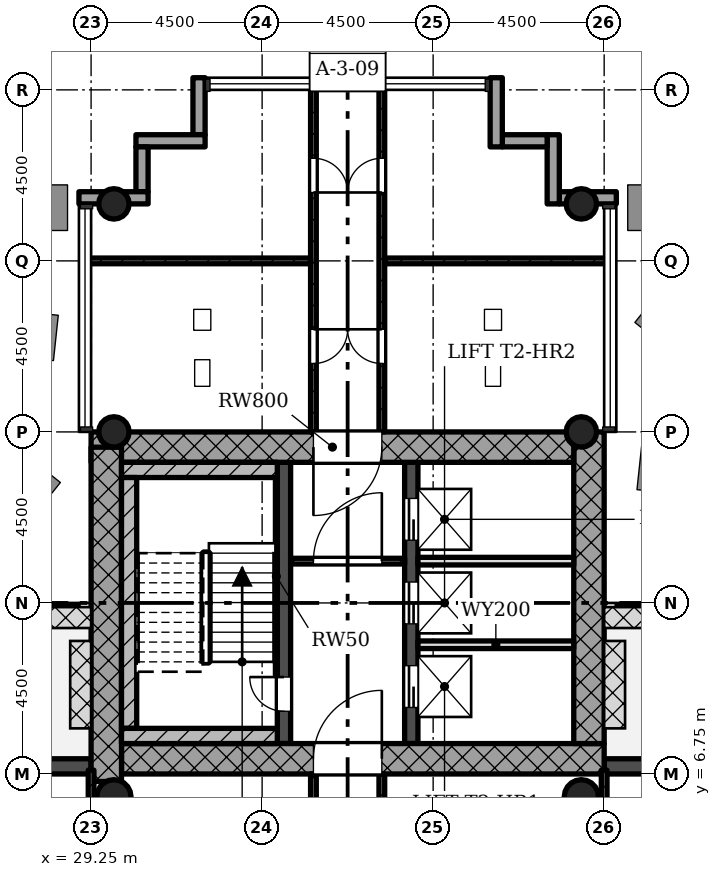
"""IFC4 building model, lengths in metres.
Left out: names, types, materials, properties, quantities, classifications, styles, units other than length and angle.
Written with IfcOpenShell. Run it as: python <this file> out.ifc"""

import sys

from ifc_helpers import new_model, si_unit, direction, frame, frame_2d, origin, origin_2d, place, context, subcontext, project, spatial, rectangle, hollow_circle, extrude, element, fill, save


model = new_model("IFC4")
c1 = context("Model", 3, precision=1e-05, world=origin(), true_north=direction((0.0, 1.0)))
c2 = subcontext(c1, "Body", "Model", "MODEL_VIEW")
j1 = project(units=[si_unit("LENGTHUNIT", "METRE"), si_unit("PLANEANGLEUNIT", "RADIAN")], contexts=[c1])
p1 = place(None, origin())
s1 = spatial("IfcSite", under=j1, at=p1, CompositionType="ELEMENT")
p2 = place(p1, origin())
s2 = spatial("IfcBuilding", under=s1, at=p2, CompositionType="ELEMENT")
p3 = place(p2, frame((0.0, 0.0, 181.3)))
s3 = spatial("IfcBuildingStorey", under=s2, at=p3, CompositionType="ELEMENT", Elevation=181.3)
p4 = place(p3, frame((30.05, 7.15, 0.0), z_axis=(0.0, 0.0, 1.0), x_axis=(1.0, 0.0, 0.0)))
e1 = element("IfcWall", 1, at=p4, inside=s3, PredefinedType="SHEAR", context=c2, shape_type="SweptSolid", body=[
    extrude(rectangle(XDim=12.7, YDim=0.8, at=frame_2d((6.35, 0.0))), origin(), (0.0, 0.0, 1.0), 4.5),
])
p5 = place(p4, frame((5.05, 0.0, 0.0)))
e2 = element("IfcOpeningElement", 2, at=p5, cuts=e1, PredefinedType="OPENING", context=c2, shape_type="SweptSolid", body=[
    extrude(rectangle(XDim=1.8, YDim=2.1, at=frame_2d((0.9, 1.05))), frame((0.0, 0.41, 0.0), z_axis=(0.0, -1.0, 0.0), x_axis=(1.0, 0.0, 0.0)), (0.0, 0.0, 1.0), 0.82),
])
p6 = place(p3, frame((42.35, 7.55, 0.0), z_axis=(0.0, 0.0, 1.0), x_axis=(0.0, 1.0, 0.0)))
e3 = element("IfcWall", 3, at=p6, inside=s3, PredefinedType="SHEAR", context=c2, shape_type="SweptSolid", body=[
    extrude(rectangle(XDim=8.2, YDim=0.8, at=frame_2d((4.1, 0.0))), origin(), (0.0, 0.0, 1.0), 4.5),
])
p7 = place(p3, frame((41.95, 15.35, 0.0), z_axis=(0.0, 0.0, 1.0), x_axis=(-1.0, 0.0, 0.0)))
e4 = element("IfcWall", 4, at=p7, inside=s3, PredefinedType="SHEAR", context=c2, shape_type="SweptSolid", body=[
    extrude(rectangle(XDim=12.7, YDim=0.8, at=frame_2d((6.35, 0.0))), origin(), (0.0, 0.0, 1.0), 4.5),
])
p8 = place(p7, frame((5.05, 0.0, 0.0)))
e5 = element("IfcOpeningElement", 5, at=p8, cuts=e4, PredefinedType="OPENING", context=c2, shape_type="SweptSolid", body=[
    extrude(rectangle(XDim=1.8, YDim=2.1, at=frame_2d((0.9, 1.05))), frame((0.0, 0.41, 0.0), z_axis=(0.0, -1.0, 0.0), x_axis=(1.0, 0.0, 0.0)), (0.0, 0.0, 1.0), 0.82),
])
p9 = place(p3, frame((29.65, 15.348, 0.0), z_axis=(0.0, 0.0, 1.0), x_axis=(0.0, -1.0, 0.0)))
e6 = element("IfcWall", 6, at=p9, inside=s3, PredefinedType="SHEAR", context=c2, shape_type="SweptSolid", body=[
    extrude(rectangle(XDim=8.796, YDim=0.8, at=frame_2d((4.398, 0.0))), origin(), (0.0, 0.0, 1.0), 4.5),
])
p10 = place(p3, frame((34.325, 7.55, 0.0), z_axis=(0.0, 0.0, 1.0), x_axis=(0.0, 1.0, 0.0)))
e7 = element("IfcWall", 7, at=p10, inside=s3, PredefinedType="SHEAR", context=c2, shape_type="SweptSolid", body=[
    extrude(rectangle(XDim=7.4, YDim=0.35, at=frame_2d((3.7, 0.0))), origin(), (0.0, 0.0, 1.0), 4.5),
])
p11 = place(p10, frame((0.85, 0.0, 0.0)))
e8 = element("IfcOpeningElement", 8, at=p11, cuts=e7, PredefinedType="OPENING", context=c2, shape_type="SweptSolid", body=[
    extrude(rectangle(XDim=0.9, YDim=2.1, at=frame_2d((0.45, 1.05))), frame((0.0, 0.185, 0.0), z_axis=(0.0, -1.0, 0.0), x_axis=(1.0, 0.0, 0.0)), (0.0, 0.0, 1.0), 0.37),
])
p12 = place(p3, frame((37.675, 7.55, 0.0), z_axis=(0.0, 0.0, 1.0), x_axis=(0.0, 1.0, 0.0)))
e9 = element("IfcWall", 9, at=p12, inside=s3, PredefinedType="SHEAR", context=c2, shape_type="SweptSolid", body=[
    extrude(rectangle(XDim=7.4, YDim=0.35, at=frame_2d((3.7, 0.0))), origin(), (0.0, 0.0, 1.0), 4.5),
])
p13 = place(p12, frame((0.95, 0.0, 0.0)))
e10 = element("IfcOpeningElement", 10, at=p13, cuts=e9, PredefinedType="OPENING", context=c2, shape_type="SweptSolid", body=[
    extrude(rectangle(XDim=1.1, YDim=2.1, at=frame_2d((0.55, 1.05))), frame((0.0, 0.185, 0.0), z_axis=(0.0, -1.0, 0.0), x_axis=(1.0, 0.0, 0.0)), (0.0, 0.0, 1.0), 0.37),
])
p14 = place(p12, frame((3.15, 0.0, 0.0)))
e11 = element("IfcOpeningElement", 11, at=p14, cuts=e9, PredefinedType="OPENING", context=c2, shape_type="SweptSolid", body=[
    extrude(rectangle(XDim=1.1, YDim=2.1, at=frame_2d((0.55, 1.05))), frame((0.0, 0.185, 0.0), z_axis=(0.0, -1.0, 0.0), x_axis=(1.0, 0.0, 0.0)), (0.0, 0.0, 1.0), 0.37),
])
p15 = place(p12, frame((5.35, 0.0, 0.0)))
e12 = element("IfcOpeningElement", 12, at=p15, cuts=e9, PredefinedType="OPENING", context=c2, shape_type="SweptSolid", body=[
    extrude(rectangle(XDim=1.1, YDim=2.1, at=frame_2d((0.55, 1.05))), frame((0.0, 0.185, 0.0), z_axis=(0.0, -1.0, 0.0), x_axis=(1.0, 0.0, 0.0)), (0.0, 0.0, 1.0), 0.37),
])
for number, where, z_axis, x_axis in (
    (13, (42.15, 15.75, 0.0), (0.0, 0.0, 1.0), (1.0, 0.0, 0.0)),
    (14, (29.85, 15.75, 0.0), (0.0, 0.0, 1.0), (1.0, 0.0, 0.0)),
    (15, (42.15, 21.75, 0.0), (0.0, 0.0, 1.0), (1.0, 0.0, 0.0)),
    (16, (29.85, 21.75, 0.0), (0.0, 0.0, 1.0), (1.0, 0.0, 0.0)),
):
    element("IfcColumn", number, at=place(p3, frame(where, z_axis=z_axis, x_axis=x_axis)), inside=s3, PredefinedType="COLUMN", context=c2, shape_type="SweptSolid", body=[
        extrude(hollow_circle(Radius=0.4, WallThickness=0.028, at=origin_2d()), origin(), (0.0, 0.0, 1.0), 4.5),
    ])
for number, where, z_axis, x_axis in (
    (17, (42.15, 6.15, 0.0), (0.0, 0.0, 1.0), (1.0, 0.0, 0.0)),
    (18, (29.85, 6.15, 0.0), (0.0, 0.0, 1.0), (1.0, 0.0, 0.0)),
):
    element("IfcColumn", number, at=place(p3, frame(where, z_axis=z_axis, x_axis=x_axis)), inside=s3, PredefinedType="COLUMN", context=c2, shape_type="SweptSolid", body=[
        extrude(hollow_circle(Radius=0.45, WallThickness=0.032, at=origin_2d()), origin(), (0.0, 0.0, 1.0), 4.5),
    ])
p16 = place(p3, frame((47.25, 6.95, -0.02), z_axis=(0.0, 0.0, 1.0), x_axis=(-1.0, 0.0, 0.0)))
e19 = element("IfcWall", 19, at=p16, inside=s3, PredefinedType="STANDARD", context=c2, shape_type="SweptSolid", body=[
    extrude(rectangle(XDim=4.5, YDim=0.4, at=frame_2d((2.25, 0.0))), origin(), (0.0, 0.0, 1.0), 4.22),
])
p17 = place(p16, frame((1.35, 0.0, 0.02)))
e20 = element("IfcOpeningElement", 20, at=p17, cuts=e19, PredefinedType="OPENING", context=c2, shape_type="SweptSolid", body=[
    extrude(rectangle(XDim=1.8, YDim=2.1, at=frame_2d((0.9, 1.05))), frame((0.0, 0.21, 0.0), z_axis=(0.0, -1.0, 0.0), x_axis=(1.0, 0.0, 0.0)), (0.0, 0.0, 1.0), 0.42),
])
p18 = place(p3, frame((43.07, 21.91, -0.3), z_axis=(0.0, 0.0, 1.0), x_axis=(-1.0, 0.0, 0.0)))
e21 = element("IfcWall", 21, at=p18, inside=s3, PredefinedType="STANDARD", context=c2, shape_type="SweptSolid", body=[
    extrude(rectangle(XDim=1.5, YDim=0.32, at=frame_2d((0.75, 0.0))), origin(), (0.0, 0.0, 1.0), 4.5),
])
p19 = place(p3, frame((41.41, 21.75, -0.3), z_axis=(0.0, 0.0, 1.0), x_axis=(0.0, 1.0, 0.0)))
e22 = element("IfcWall", 22, at=p19, inside=s3, PredefinedType="STANDARD", context=c2, shape_type="SweptSolid", body=[
    extrude(rectangle(XDim=1.82, YDim=0.32, at=frame_2d((0.91, 0.0))), origin(), (0.0, 0.0, 1.0), 4.5),
])
p20 = place(p3, frame((41.25, 23.41, -0.3), z_axis=(0.0, 0.0, 1.0), x_axis=(-1.0, 0.0, 0.0)))
e23 = element("IfcWall", 23, at=p20, inside=s3, PredefinedType="STANDARD", context=c2, shape_type="SweptSolid", body=[
    extrude(rectangle(XDim=1.18, YDim=0.32, at=frame_2d((0.59, 0.0))), origin(), (0.0, 0.0, 1.0), 4.5),
])
p21 = place(p3, frame((39.91, 23.25, -0.3), z_axis=(0.0, 0.0, 1.0), x_axis=(0.0, 1.0, 0.0)))
e24 = element("IfcWall", 24, at=p21, inside=s3, PredefinedType="STANDARD", context=c2, shape_type="SweptSolid", body=[
    extrude(rectangle(XDim=1.82, YDim=0.32, at=frame_2d((0.91, 0.0))), origin(), (0.0, 0.0, 1.0), 4.5),
])
p22 = place(p3, frame((32.09, 25.07, -0.3), z_axis=(0.0, 0.0, 1.0), x_axis=(0.0, -1.0, 0.0)))
e25 = element("IfcWall", 25, at=p22, inside=s3, PredefinedType="STANDARD", context=c2, shape_type="SweptSolid", body=[
    extrude(rectangle(XDim=1.5, YDim=0.32, at=frame_2d((0.75, 0.0))), origin(), (0.0, 0.0, 1.0), 4.5),
])
p23 = place(p3, frame((32.25, 23.41, -0.3), z_axis=(0.0, 0.0, 1.0), x_axis=(-1.0, 0.0, 0.0)))
e26 = element("IfcWall", 26, at=p23, inside=s3, PredefinedType="STANDARD", context=c2, shape_type="SweptSolid", body=[
    extrude(rectangle(XDim=1.82, YDim=0.32, at=frame_2d((0.91, 0.0))), origin(), (0.0, 0.0, 1.0), 4.5),
])
p24 = place(p3, frame((30.59, 23.25, -0.3), z_axis=(0.0, 0.0, 1.0), x_axis=(0.0, -1.0, 0.0)))
e27 = element("IfcWall", 27, at=p24, inside=s3, PredefinedType="STANDARD", context=c2, shape_type="SweptSolid", body=[
    extrude(rectangle(XDim=1.18, YDim=0.32, at=frame_2d((0.59, 0.0))), origin(), (0.0, 0.0, 1.0), 4.5),
])
p25 = place(p3, frame((30.75, 21.91, -0.3), z_axis=(0.0, 0.0, 1.0), x_axis=(-1.0, 0.0, 0.0)))
e28 = element("IfcWall", 28, at=p25, inside=s3, PredefinedType="STANDARD", context=c2, shape_type="SweptSolid", body=[
    extrude(rectangle(XDim=1.82, YDim=0.32, at=frame_2d((0.91, 0.0))), origin(), (0.0, 0.0, 1.0), 4.5),
])
p26 = place(p3, frame((29.25, 6.95, -0.02), z_axis=(0.0, 0.0, 1.0), x_axis=(-1.0, 0.0, 0.0)))
e29 = element("IfcWall", 29, at=p26, inside=s3, PredefinedType="STANDARD", context=c2, shape_type="SweptSolid", body=[
    extrude(rectangle(XDim=4.5, YDim=0.4, at=frame_2d((2.25, 0.0))), origin(), (0.0, 0.0, 1.0), 4.22),
])
p27 = place(p26, frame((1.35, 0.0, 0.02)))
e30 = element("IfcOpeningElement", 30, at=p27, cuts=e29, PredefinedType="OPENING", context=c2, shape_type="SweptSolid", body=[
    extrude(rectangle(XDim=1.8, YDim=2.1, at=frame_2d((0.9, 1.05))), frame((0.0, 0.21, 0.0), z_axis=(0.0, -1.0, 0.0), x_axis=(1.0, 0.0, 0.0)), (0.0, 0.0, 1.0), 0.42),
])
p28 = place(p3, frame((37.5, 12.35, 0.0), z_axis=(0.0, 0.0, 1.0), x_axis=(-1.0, 0.0, 0.0)))
e31 = element("IfcWall", 31, at=p28, inside=s3, PredefinedType="PARTITIONING", context=c2, shape_type="SweptSolid", body=[
    extrude(rectangle(XDim=3.0, YDim=0.15, at=frame_2d((1.5, 0.0))), origin(), (0.0, 0.0, 1.0), 4.08),
])
p29 = place(p28, frame((0.6, 0.0, 0.0)))
e32 = element("IfcOpeningElement", 32, at=p29, cuts=e31, PredefinedType="OPENING", context=c2, shape_type="SweptSolid", body=[
    extrude(rectangle(XDim=1.8, YDim=2.1, at=frame_2d((0.9, 1.05))), frame((0.0, 0.085, 0.0), z_axis=(0.0, -1.0, 0.0), x_axis=(1.0, 0.0, 0.0)), (0.0, 0.0, 1.0), 0.17),
])
for number, where, z_axis, x_axis in (
    (33, (41.95, 10.15, 0.0), (0.0, 0.0, 1.0), (-1.0, 0.0, 0.0)),
    (34, (41.95, 12.35, 0.0), (0.0, 0.0, 1.0), (-1.0, 0.0, 0.0)),
):
    element("IfcWall", number, at=place(p3, frame(where, z_axis=z_axis, x_axis=x_axis)), inside=s3, PredefinedType="SOLIDWALL", context=c2, shape_type="SweptSolid", body=[
        extrude(rectangle(XDim=4.1, YDim=0.2, at=frame_2d((2.05, 0.0))), origin(), (0.0, 0.0, 1.0), 4.08),
    ])
p30 = place(p3, frame((35.1, 0.9, 0.0), z_axis=(0.0, 0.0, 1.0), x_axis=(0.0, 1.0, 0.0)))
e35 = element("IfcWall", 35, at=p30, inside=s3, PredefinedType="PARTITIONING", context=c2, shape_type="SweptSolid", body=[
    extrude(rectangle(XDim=5.85, YDim=0.15, at=frame_2d((2.925, 0.0))), origin(), (0.0, 0.0, 1.0), 4.08),
])
p31 = place(p30, frame((2.475, 0.0, 0.0)))
e36 = element("IfcOpeningElement", 36, at=p31, cuts=e35, PredefinedType="OPENING", context=c2, shape_type="SweptSolid", body=[
    extrude(rectangle(XDim=0.9, YDim=2.1, at=frame_2d((0.45, 1.05))), frame((0.0, 0.085, 0.0), z_axis=(0.0, -1.0, 0.0), x_axis=(1.0, 0.0, 0.0)), (0.0, 0.0, 1.0), 0.17),
])
p32 = place(p3, frame((36.9, 0.9, 0.0), z_axis=(0.0, 0.0, 1.0), x_axis=(0.0, 1.0, 0.0)))
e37 = element("IfcWall", 37, at=p32, inside=s3, PredefinedType="PARTITIONING", context=c2, shape_type="SweptSolid", body=[
    extrude(rectangle(XDim=5.85, YDim=0.15, at=frame_2d((2.925, 0.0))), origin(), (0.0, 0.0, 1.0), 4.08),
])
p33 = place(p32, frame((2.475, 0.0, 0.0)))
e38 = element("IfcOpeningElement", 38, at=p33, cuts=e37, PredefinedType="OPENING", context=c2, shape_type="SweptSolid", body=[
    extrude(rectangle(XDim=0.9, YDim=2.1, at=frame_2d((0.45, 1.05))), frame((0.0, 0.085, 0.0), z_axis=(0.0, -1.0, 0.0), x_axis=(1.0, 0.0, 0.0)), (0.0, 0.0, 1.0), 0.17),
])
p34 = place(p3, frame((35.1, 15.75, 0.0), z_axis=(0.0, 0.0, 1.0), x_axis=(0.0, 1.0, 0.0)))
e39 = element("IfcWall", 39, at=p34, inside=s3, PredefinedType="PARTITIONING", context=c2, shape_type="SweptSolid", body=[
    extrude(rectangle(XDim=9.1, YDim=0.15, at=frame_2d((4.55, 0.0))), origin(), (0.0, 0.0, 1.0), 4.08),
])
p35 = place(p34, frame((1.8, 0.0, 0.0)))
e40 = element("IfcOpeningElement", 40, at=p35, cuts=e39, PredefinedType="OPENING", context=c2, shape_type="SweptSolid", body=[
    extrude(rectangle(XDim=0.9, YDim=2.1, at=frame_2d((0.45, 1.05))), frame((0.0, 0.085, 0.0), z_axis=(0.0, -1.0, 0.0), x_axis=(1.0, 0.0, 0.0)), (0.0, 0.0, 1.0), 0.17),
])
p36 = place(p34, frame((6.3, 0.0, 0.0)))
e41 = element("IfcOpeningElement", 41, at=p36, cuts=e39, PredefinedType="OPENING", context=c2, shape_type="SweptSolid", body=[
    extrude(rectangle(XDim=0.9, YDim=2.1, at=frame_2d((0.45, 1.05))), frame((0.0, 0.085, 0.0), z_axis=(0.0, -1.0, 0.0), x_axis=(1.0, 0.0, 0.0)), (0.0, 0.0, 1.0), 0.17),
])
p37 = place(p3, frame((35.025, 20.25, 0.0), z_axis=(0.0, 0.0, 1.0), x_axis=(-1.0, 0.0, 0.0)))
e42 = element("IfcWall", 42, at=p37, inside=s3, PredefinedType="PARTITIONING", context=c2, shape_type="SweptSolid", body=[
    extrude(rectangle(XDim=5.875, YDim=0.15, at=frame_2d((2.938, 0.0))), origin(), (0.0, 0.0, 1.0), 4.08),
])
p38 = place(p3, frame((36.9, 15.75, 0.0), z_axis=(0.0, 0.0, 1.0), x_axis=(0.0, 1.0, 0.0)))
e43 = element("IfcWall", 43, at=p38, inside=s3, PredefinedType="PARTITIONING", context=c2, shape_type="SweptSolid", body=[
    extrude(rectangle(XDim=9.1, YDim=0.15, at=frame_2d((4.55, 0.0))), origin(), (0.0, 0.0, 1.0), 4.08),
])
p39 = place(p38, frame((1.8, 0.0, 0.0)))
e44 = element("IfcOpeningElement", 44, at=p39, cuts=e43, PredefinedType="OPENING", context=c2, shape_type="SweptSolid", body=[
    extrude(rectangle(XDim=0.9, YDim=2.1, at=frame_2d((0.45, 1.05))), frame((0.0, 0.085, 0.0), z_axis=(0.0, -1.0, 0.0), x_axis=(1.0, 0.0, 0.0)), (0.0, 0.0, 1.0), 0.17),
])
p40 = place(p38, frame((6.3, 0.0, 0.0)))
e45 = element("IfcOpeningElement", 45, at=p40, cuts=e43, PredefinedType="OPENING", context=c2, shape_type="SweptSolid", body=[
    extrude(rectangle(XDim=0.9, YDim=2.1, at=frame_2d((0.45, 1.05))), frame((0.0, 0.085, 0.0), z_axis=(0.0, -1.0, 0.0), x_axis=(1.0, 0.0, 0.0)), (0.0, 0.0, 1.0), 0.17),
])
p41 = place(p3, frame((36.975, 20.25, 0.0), z_axis=(0.0, 0.0, 1.0), x_axis=(1.0, 0.0, 0.0)))
e46 = element("IfcWall", 46, at=p41, inside=s3, PredefinedType="PARTITIONING", context=c2, shape_type="SweptSolid", body=[
    extrude(rectangle(XDim=5.875, YDim=0.15, at=frame_2d((2.938, 0.0))), origin(), (0.0, 0.0, 1.0), 4.08),
])
p42 = place(p3, frame((29.25, -6.85, 0.0), z_axis=(0.0, 0.0, 1.0), x_axis=(0.0, 1.0, 0.0)))
e47 = element("IfcWall", 47, at=p42, inside=s3, PredefinedType="PARTITIONING", context=c2, shape_type="SweptSolid", body=[
    extrude(rectangle(XDim=13.7, YDim=0.15, at=frame_2d((6.85, 0.0))), origin(), (0.0, 0.0, 1.0), 4.08),
])
p43 = place(p42, frame((5.95, 0.0, 0.0)))
e48 = element("IfcOpeningElement", 48, at=p43, cuts=e47, PredefinedType="OPENING", context=c2, shape_type="SweptSolid", body=[
    extrude(rectangle(XDim=1.8, YDim=2.1, at=frame_2d((0.9, 1.05))), frame((0.0, 0.085, 0.0), z_axis=(0.0, -1.0, 0.0), x_axis=(1.0, 0.0, 0.0)), (0.0, 0.0, 1.0), 0.17),
])
p44 = place(p3, frame((42.75, -6.85, 0.0), z_axis=(0.0, 0.0, 1.0), x_axis=(0.0, 1.0, 0.0)))
e49 = element("IfcWall", 49, at=p44, inside=s3, PredefinedType="PARTITIONING", context=c2, shape_type="SweptSolid", body=[
    extrude(rectangle(XDim=13.7, YDim=0.15, at=frame_2d((6.85, 0.0))), origin(), (0.0, 0.0, 1.0), 4.08),
])
p45 = place(p44, frame((5.95, 0.0, 0.0)))
e50 = element("IfcOpeningElement", 50, at=p45, cuts=e49, PredefinedType="OPENING", context=c2, shape_type="SweptSolid", body=[
    extrude(rectangle(XDim=1.8, YDim=2.1, at=frame_2d((0.9, 1.05))), frame((0.0, 0.085, 0.0), z_axis=(0.0, -1.0, 0.0), x_axis=(1.0, 0.0, 0.0)), (0.0, 0.0, 1.0), 0.17),
])
p46 = place(p3, frame((34.15, 14.75, 0.0), z_axis=(0.0, 0.0, 1.0), x_axis=(-1.0, 0.0, 0.0)))
e51 = element("IfcWall", 51, at=p46, inside=s3, PredefinedType="SHEAR", context=c2, shape_type="SweptSolid", body=[
    extrude(rectangle(XDim=4.1, YDim=0.4, at=frame_2d((2.05, 0.0))), origin(), (0.0, 0.0, 1.0), 4.5),
])
p47 = place(p3, frame((30.25, 7.95, 0.0), z_axis=(0.0, 0.0, 1.0), x_axis=(0.0, 1.0, 0.0)))
e52 = element("IfcWall", 52, at=p47, inside=s3, PredefinedType="SHEAR", context=c2, shape_type="SweptSolid", body=[
    extrude(rectangle(XDim=6.6, YDim=0.4, at=frame_2d((3.3, 0.0))), origin(), (0.0, 0.0, 1.0), 4.5),
])
p48 = place(p3, frame((34.15, 7.75, 0.0), z_axis=(0.0, 0.0, 1.0), x_axis=(-1.0, 0.0, 0.0)))
e53 = element("IfcWall", 53, at=p48, inside=s3, PredefinedType="SHEAR", context=c2, shape_type="SweptSolid", body=[
    extrude(rectangle(XDim=4.1, YDim=0.4, at=frame_2d((2.05, 0.0))), origin(), (0.0, 0.0, 1.0), 4.5),
])
p49 = place(p3, frame((34.125, 9.35, 0.0), z_axis=(0.0, 0.0, 1.0), x_axis=(0.0, 1.0, 0.0)))
e54 = element("IfcWall", 54, at=p49, inside=s3, PredefinedType="SHEAR", context=c2, shape_type="SweptSolid", body=[
    extrude(rectangle(XDim=5.2, YDim=0.05, at=frame_2d((2.6, 0.0))), origin(), (0.0, 0.0, 1.0), 4.5),
])
p50 = place(p29, origin())
e55 = element("IfcDoor", 55, at=p50, inside=s3, OperationType="SINGLE_SWING_LEFT", PredefinedType="DOOR", context=c2, shape_type="SweptSolid", body=[
    extrude(rectangle(XDim=1.8, YDim=2.1, at=frame_2d((0.9, 1.05))), frame((0.0, 0.025, 0.0), z_axis=(0.0, -1.0, 0.0), x_axis=(1.0, 0.0, 0.0)), (0.0, 0.0, 1.0), 0.05),
])
fill(e32, e55)
p51 = place(p35, origin())
e56 = element("IfcDoor", 56, at=p51, inside=s3, OperationType="SINGLE_SWING_RIGHT", PredefinedType="DOOR", context=c2, shape_type="SweptSolid", body=[
    extrude(rectangle(XDim=0.9, YDim=2.1, at=frame_2d((0.45, 1.05))), frame((0.0, 0.025, 0.0), z_axis=(0.0, -1.0, 0.0), x_axis=(1.0, 0.0, 0.0)), (0.0, 0.0, 1.0), 0.05),
])
fill(e40, e56)
p52 = place(p36, origin())
e57 = element("IfcDoor", 57, at=p52, inside=s3, OperationType="SINGLE_SWING_LEFT", PredefinedType="DOOR", context=c2, shape_type="SweptSolid", body=[
    extrude(rectangle(XDim=0.9, YDim=2.1, at=frame_2d((0.45, 1.05))), frame((0.0, 0.025, 0.0), z_axis=(0.0, -1.0, 0.0), x_axis=(1.0, 0.0, 0.0)), (0.0, 0.0, 1.0), 0.05),
])
fill(e41, e57)
p53 = place(p39, origin())
e58 = element("IfcDoor", 58, at=p53, inside=s3, OperationType="SINGLE_SWING_LEFT", PredefinedType="DOOR", context=c2, shape_type="SweptSolid", body=[
    extrude(rectangle(XDim=0.9, YDim=2.1, at=frame_2d((0.45, 1.05))), frame((0.0, 0.025, 0.0), z_axis=(0.0, -1.0, 0.0), x_axis=(1.0, 0.0, 0.0)), (0.0, 0.0, 1.0), 0.05),
])
fill(e44, e58)
p54 = place(p40, origin())
e59 = element("IfcDoor", 59, at=p54, inside=s3, OperationType="SINGLE_SWING_RIGHT", PredefinedType="DOOR", context=c2, shape_type="SweptSolid", body=[
    extrude(rectangle(XDim=0.9, YDim=2.1, at=frame_2d((0.45, 1.05))), frame((0.0, 0.025, 0.0), z_axis=(0.0, -1.0, 0.0), x_axis=(1.0, 0.0, 0.0)), (0.0, 0.0, 1.0), 0.05),
])
fill(e45, e59)
p55 = place(p11, origin())
e60 = element("IfcDoor", 60, at=p55, inside=s3, OperationType="SINGLE_SWING_LEFT", PredefinedType="DOOR", context=c2, shape_type="SweptSolid", body=[
    extrude(rectangle(XDim=0.9, YDim=2.1, at=frame_2d((0.45, 1.05))), frame((0.0, 0.025, 0.0), z_axis=(0.0, -1.0, 0.0), x_axis=(1.0, 0.0, 0.0)), (0.0, 0.0, 1.0), 0.05),
])
fill(e8, e60)
p56 = place(p13, origin())
e61 = element("IfcDoor", 61, at=p56, inside=s3, OperationType="SLIDING_TO_LEFT", PredefinedType="DOOR", context=c2, shape_type="SweptSolid", body=[
    extrude(rectangle(XDim=1.1, YDim=2.1, at=frame_2d((0.55, 1.05))), frame((0.0, 0.025, 0.0), z_axis=(0.0, -1.0, 0.0), x_axis=(1.0, 0.0, 0.0)), (0.0, 0.0, 1.0), 0.05),
])
fill(e10, e61)
p57 = place(p14, origin())
e62 = element("IfcDoor", 62, at=p57, inside=s3, OperationType="SLIDING_TO_LEFT", PredefinedType="DOOR", context=c2, shape_type="SweptSolid", body=[
    extrude(rectangle(XDim=1.1, YDim=2.1, at=frame_2d((0.55, 1.05))), frame((0.0, 0.025, 0.0), z_axis=(0.0, -1.0, 0.0), x_axis=(1.0, 0.0, 0.0)), (0.0, 0.0, 1.0), 0.05),
])
fill(e11, e62)
p58 = place(p15, origin())
e63 = element("IfcDoor", 63, at=p58, inside=s3, OperationType="SLIDING_TO_LEFT", PredefinedType="DOOR", context=c2, shape_type="SweptSolid", body=[
    extrude(rectangle(XDim=1.1, YDim=2.1, at=frame_2d((0.55, 1.05))), frame((0.0, 0.025, 0.0), z_axis=(0.0, -1.0, 0.0), x_axis=(1.0, 0.0, 0.0)), (0.0, 0.0, 1.0), 0.05),
])
fill(e12, e63)
p59 = place(p5, origin())
e64 = element("IfcDoor", 64, at=p59, inside=s3, OperationType="SINGLE_SWING_LEFT", PredefinedType="DOOR", context=c2, shape_type="SweptSolid", body=[
    extrude(rectangle(XDim=1.8, YDim=2.1, at=frame_2d((0.9, 1.05))), frame((0.0, 0.025, 0.0), z_axis=(0.0, -1.0, 0.0), x_axis=(1.0, 0.0, 0.0)), (0.0, 0.0, 1.0), 0.05),
])
fill(e2, e64)
p60 = place(p8, origin())
e65 = element("IfcDoor", 65, at=p60, inside=s3, OperationType="SINGLE_SWING_LEFT", PredefinedType="DOOR", context=c2, shape_type="SweptSolid", body=[
    extrude(rectangle(XDim=1.8, YDim=2.1, at=frame_2d((0.9, 1.05))), frame((0.0, 0.025, 0.0), z_axis=(0.0, -1.0, 0.0), x_axis=(1.0, 0.0, 0.0)), (0.0, 0.0, 1.0), 0.05),
])
fill(e5, e65)
save(model, sys.argv[1])
